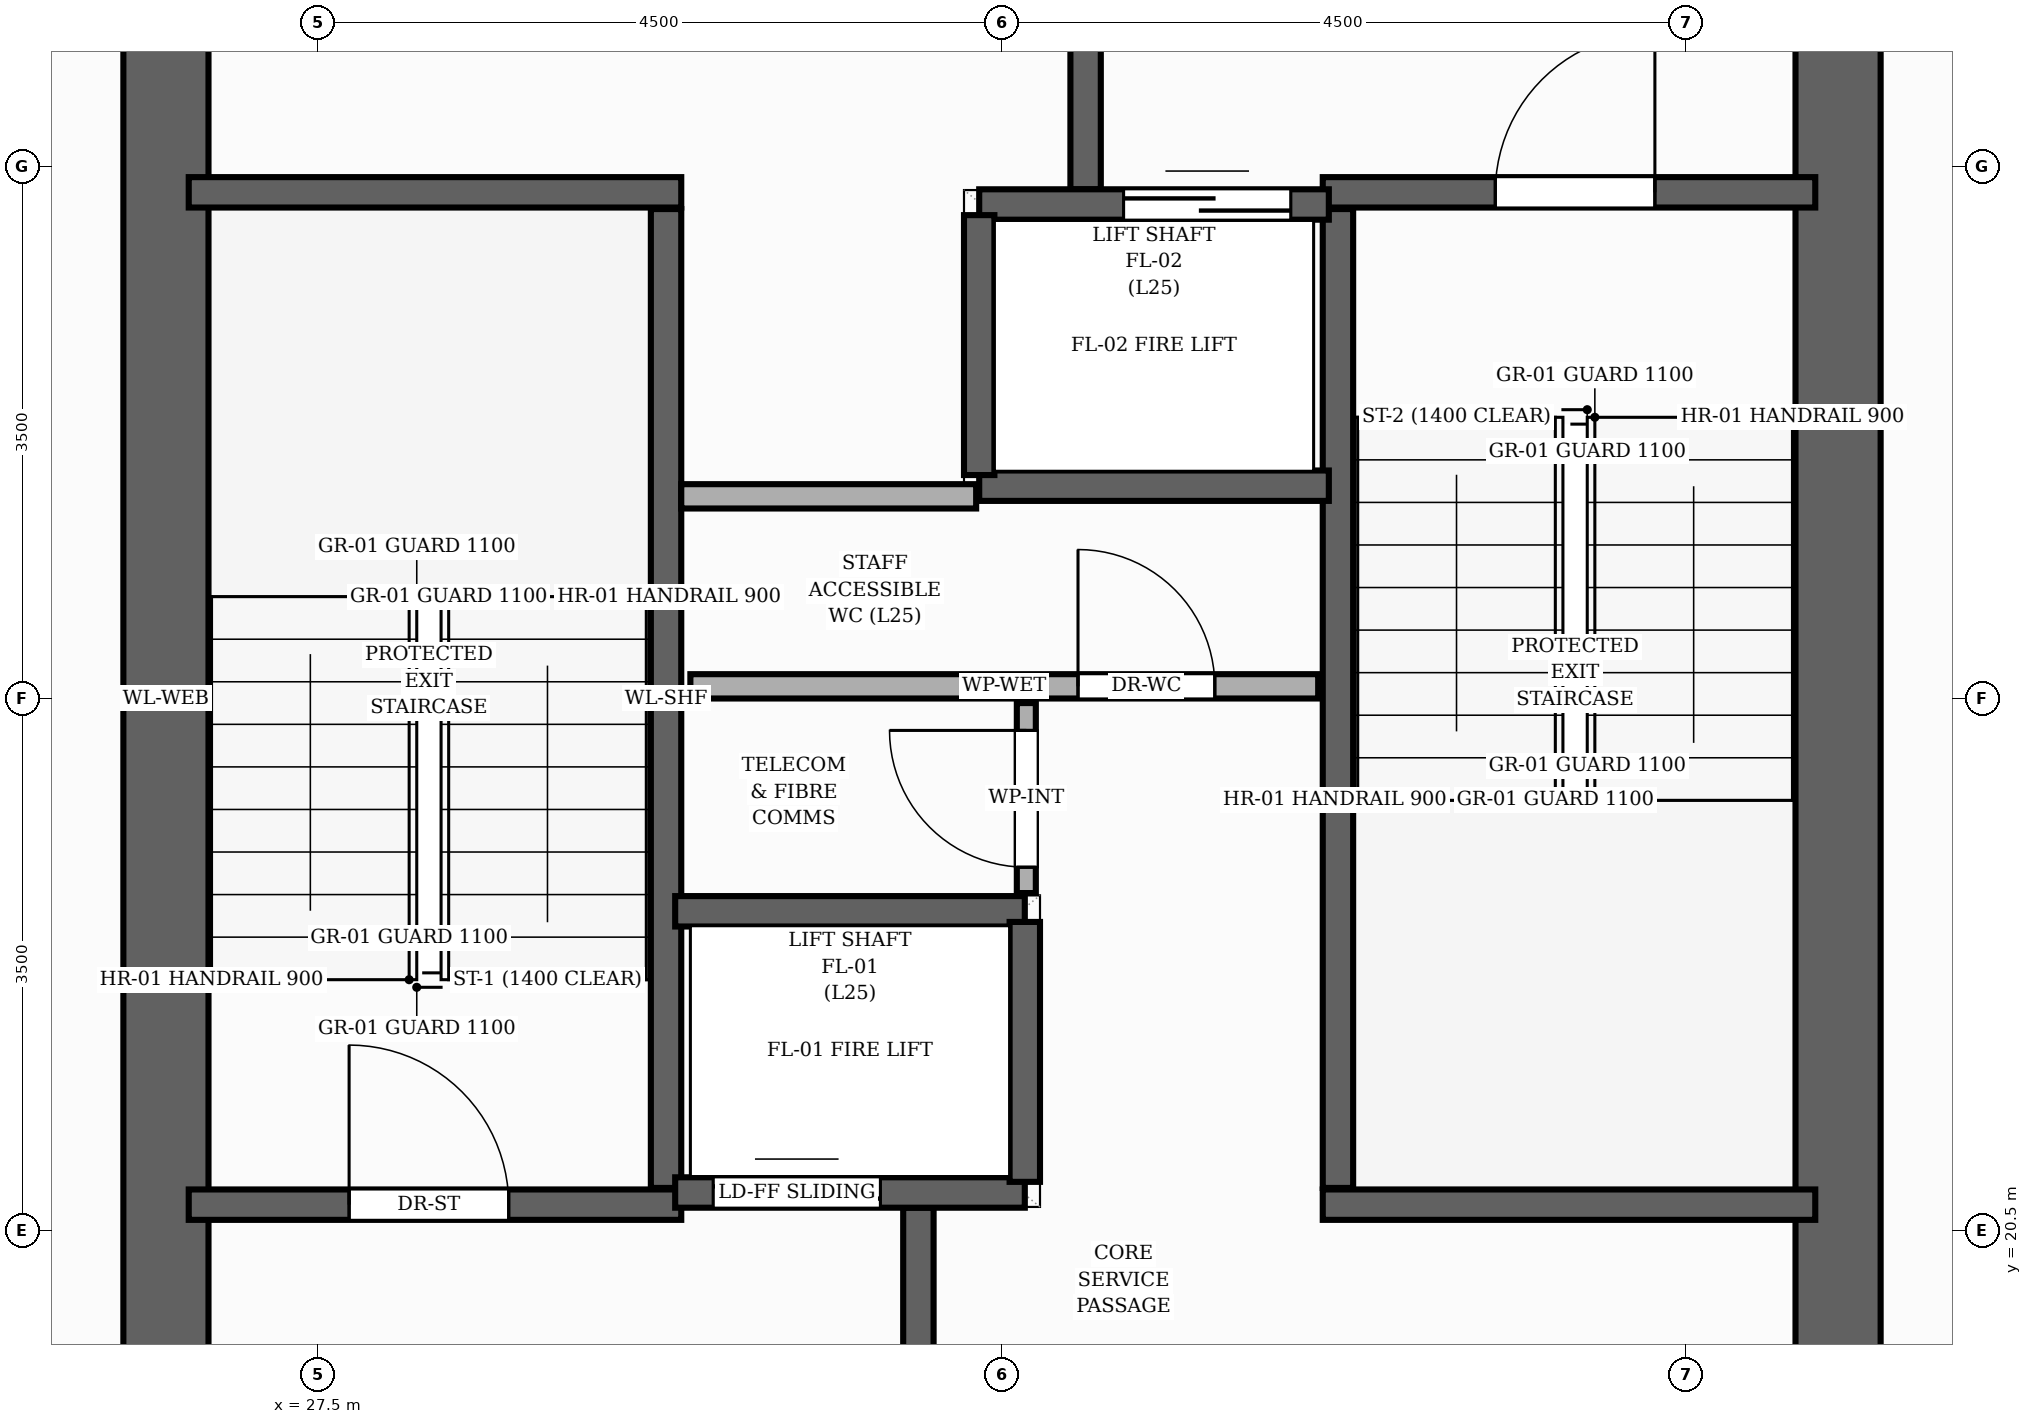
"""IFC4 building model, lengths in metres.
Left out: names, types, materials, properties, quantities, classifications, styles, units other than length and angle.
Written with IfcOpenShell. Run it as: python <this file> out.ifc"""

import sys

from ifc_helpers import new_model, si_unit, direction, frame, frame_2d, origin, place, context, subcontext, project, spatial, rectangle, extrude, element, fill, save


model = new_model("IFC4")
c1 = context("Model", 3, precision=1e-05, world=origin(), true_north=direction((0.0, 1.0)))
c2 = subcontext(c1, "Body", "Model", "MODEL_VIEW")
j1 = project(units=[si_unit("LENGTHUNIT", "METRE"), si_unit("PLANEANGLEUNIT", "RADIAN")], contexts=[c1])
p1 = place(None, origin())
s1 = spatial("IfcSite", under=j1, at=p1, CompositionType="ELEMENT")
p2 = place(p1, origin())
s2 = spatial("IfcBuilding", under=s1, at=p2, CompositionType="ELEMENT")
p3 = place(p2, frame((0.0, 0.0, 83.68)))
s3 = spatial("IfcBuildingStorey", under=s2, at=p3, CompositionType="ELEMENT", Elevation=83.68)
for number, where, z_axis, x_axis in (
    (1, (26.5, 17.35, 0.0), (0.0, 0.0, 1.0), (0.0, 1.0, 0.0)),
    (2, (37.5, 17.35, 0.0), (0.0, 0.0, 1.0), (0.0, 1.0, 0.0)),
):
    element("IfcWall", number, at=place(p3, frame(where, z_axis=z_axis, x_axis=x_axis)), inside=s3, PredefinedType="SHEAR", context=c2, shape_type="SweptSolid", body=[
        extrude(rectangle(XDim=13.3, YDim=0.56, at=frame_2d((6.65, 0.0))), origin(), (0.0, 0.0, 1.0), 3.2),
    ])
p4 = place(p3, frame((29.79, 20.78, 0.0), z_axis=(0.0, 0.0, 1.0), x_axis=(0.0, 1.0, 0.0)))
e3 = element("IfcWall", 3, at=p4, inside=s3, PredefinedType="SHEAR", context=c2, shape_type="SweptSolid", body=[
    extrude(rectangle(XDim=6.44, YDim=0.2, at=frame_2d((3.22, 0.0))), origin(), (0.0, 0.0, 1.0), 3.2),
])
p5 = place(p3, frame((26.65, 27.33, 0.0), z_axis=(0.0, 0.0, 1.0), x_axis=(1.0, 0.0, 0.0)))
e4 = element("IfcWall", 4, at=p5, inside=s3, PredefinedType="SHEAR", context=c2, shape_type="SweptSolid", body=[
    extrude(rectangle(XDim=3.24, YDim=0.2, at=frame_2d((1.62, 0.0))), origin(), (0.0, 0.0, 1.0), 3.2),
])
p6 = place(p3, frame((26.65, 20.67, 0.0), z_axis=(0.0, 0.0, 1.0), x_axis=(1.0, 0.0, 0.0)))
e5 = element("IfcWall", 5, at=p6, inside=s3, PredefinedType="SHEAR", context=c2, shape_type="SweptSolid", body=[
    extrude(rectangle(XDim=3.24, YDim=0.2, at=frame_2d((1.62, 0.0))), origin(), (0.0, 0.0, 1.0), 3.2),
])
p7 = place(p6, frame((1.055, 0.0, 0.0)))
e6 = element("IfcOpeningElement", 6, at=p7, cuts=e5, PredefinedType="OPENING", context=c2, shape_type="SweptSolid", body=[
    extrude(rectangle(XDim=1.05, YDim=2.15, at=frame_2d((0.525, 1.075))), frame((0.0, 0.11, 0.0), z_axis=(0.0, -1.0, 0.0), x_axis=(1.0, 0.0, 0.0)), (0.0, 0.0, 1.0), 0.22),
])
p8 = place(p3, frame((34.21, 20.78, 0.0), z_axis=(0.0, 0.0, 1.0), x_axis=(0.0, 1.0, 0.0)))
e7 = element("IfcWall", 7, at=p8, inside=s3, PredefinedType="SHEAR", context=c2, shape_type="SweptSolid", body=[
    extrude(rectangle(XDim=6.44, YDim=0.2, at=frame_2d((3.22, 0.0))), origin(), (0.0, 0.0, 1.0), 3.2),
])
p9 = place(p3, frame((34.11, 20.67, 0.0), z_axis=(0.0, 0.0, 1.0), x_axis=(1.0, 0.0, 0.0)))
e8 = element("IfcWall", 8, at=p9, inside=s3, PredefinedType="SHEAR", context=c2, shape_type="SweptSolid", body=[
    extrude(rectangle(XDim=3.24, YDim=0.2, at=frame_2d((1.62, 0.0))), origin(), (0.0, 0.0, 1.0), 3.2),
])
p10 = place(p3, frame((34.11, 27.33, 0.0), z_axis=(0.0, 0.0, 1.0), x_axis=(1.0, 0.0, 0.0)))
e9 = element("IfcWall", 9, at=p10, inside=s3, PredefinedType="SHEAR", context=c2, shape_type="SweptSolid", body=[
    extrude(rectangle(XDim=3.24, YDim=0.2, at=frame_2d((1.62, 0.0))), origin(), (0.0, 0.0, 1.0), 3.2),
])
p11 = place(p10, frame((1.135, 0.0, 0.0)))
e10 = element("IfcOpeningElement", 10, at=p11, cuts=e9, PredefinedType="OPENING", context=c2, shape_type="SweptSolid", body=[
    extrude(rectangle(XDim=1.05, YDim=2.15, at=frame_2d((0.525, 1.075))), frame((0.0, 0.11, 0.0), z_axis=(0.0, -1.0, 0.0), x_axis=(1.0, 0.0, 0.0)), (0.0, 0.0, 1.0), 0.22),
])
for number, where, z_axis, x_axis in (
    (11, (31.45, 17.15, 0.0), (0.0, 0.0, 1.0), (0.0, 1.0, 0.0)),
    (12, (32.55, 27.35, 0.0), (0.0, 0.0, 1.0), (0.0, 1.0, 0.0)),
):
    element("IfcWall", number, at=place(p3, frame(where, z_axis=z_axis, x_axis=x_axis)), inside=s3, PredefinedType="SHEAR", context=c2, shape_type="SweptSolid", body=[
        extrude(rectangle(XDim=3.5, YDim=0.2, at=frame_2d((1.75, 0.0))), origin(), (0.0, 0.0, 1.0), 3.2),
    ])
p12 = place(p3, frame((29.85, 20.75, 0.0), z_axis=(0.0, 0.0, 1.0), x_axis=(1.0, 0.0, 0.0)))
e13 = element("IfcWall", 13, at=p12, inside=s3, PredefinedType="SHEAR", context=c2, shape_type="SweptSolid", body=[
    extrude(rectangle(XDim=2.3, YDim=0.2, at=frame_2d((1.15, 0.0))), origin(), (0.0, 0.0, 1.0), 3.2),
])
p13 = place(p12, frame((0.25, 0.0, 0.0)))
e14 = element("IfcOpeningElement", 14, at=p13, cuts=e13, PredefinedType="OPENING", context=c2, shape_type="SweptSolid", body=[
    extrude(rectangle(XDim=1.1, YDim=2.15, at=frame_2d((0.55, 1.075))), frame((0.0, 0.11, 0.0), z_axis=(0.0, -1.0, 0.0), x_axis=(1.0, 0.0, 0.0)), (0.0, 0.0, 1.0), 0.22),
])
p14 = place(p3, frame((29.85, 22.6, 0.0), z_axis=(0.0, 0.0, 1.0), x_axis=(1.0, 0.0, 0.0)))
e15 = element("IfcWall", 15, at=p14, inside=s3, PredefinedType="SHEAR", context=c2, shape_type="SweptSolid", body=[
    extrude(rectangle(XDim=2.3, YDim=0.2, at=frame_2d((1.15, 0.0))), origin(), (0.0, 0.0, 1.0), 3.2),
])
p15 = place(p3, frame((32.15, 20.82, 0.0), z_axis=(0.0, 0.0, 1.0), x_axis=(0.0, 1.0, 0.0)))
e16 = element("IfcWall", 16, at=p15, inside=s3, PredefinedType="SHEAR", context=c2, shape_type="SweptSolid", body=[
    extrude(rectangle(XDim=1.71, YDim=0.2, at=frame_2d((0.855, 0.0))), origin(), (0.0, 0.0, 1.0), 3.2),
])
p16 = place(p3, frame((31.85, 27.25, 0.0), z_axis=(0.0, 0.0, 1.0), x_axis=(1.0, 0.0, 0.0)))
e17 = element("IfcWall", 17, at=p16, inside=s3, PredefinedType="SHEAR", context=c2, shape_type="SweptSolid", body=[
    extrude(rectangle(XDim=2.3, YDim=0.2, at=frame_2d((1.15, 0.0))), origin(), (0.0, 0.0, 1.0), 3.2),
])
p17 = place(p16, frame((0.95, 0.0, 0.0)))
e18 = element("IfcOpeningElement", 18, at=p17, cuts=e17, PredefinedType="OPENING", context=c2, shape_type="SweptSolid", body=[
    extrude(rectangle(XDim=1.1, YDim=2.15, at=frame_2d((0.55, 1.075))), frame((0.0, 0.11, 0.0), z_axis=(0.0, -1.0, 0.0), x_axis=(1.0, 0.0, 0.0)), (0.0, 0.0, 1.0), 0.22),
])
p18 = place(p3, frame((31.85, 25.4, 0.0), z_axis=(0.0, 0.0, 1.0), x_axis=(1.0, 0.0, 0.0)))
e19 = element("IfcWall", 19, at=p18, inside=s3, PredefinedType="SHEAR", context=c2, shape_type="SweptSolid", body=[
    extrude(rectangle(XDim=2.3, YDim=0.2, at=frame_2d((1.15, 0.0))), origin(), (0.0, 0.0, 1.0), 3.2),
])
p19 = place(p3, frame((31.85, 25.47, 0.0), z_axis=(0.0, 0.0, 1.0), x_axis=(0.0, 1.0, 0.0)))
e20 = element("IfcWall", 20, at=p19, inside=s3, PredefinedType="SHEAR", context=c2, shape_type="SweptSolid", body=[
    extrude(rectangle(XDim=1.71, YDim=0.2, at=frame_2d((0.855, 0.0))), origin(), (0.0, 0.0, 1.0), 3.2),
])
p20 = place(p3, frame((29.95, 24.08, 0.0), z_axis=(0.0, 0.0, 1.0), x_axis=(1.0, 0.0, 0.0)))
e21 = element("IfcWall", 21, at=p20, inside=s3, PredefinedType="PLUMBINGWALL", context=c2, shape_type="SweptSolid", body=[
    extrude(rectangle(XDim=4.13, YDim=0.16, at=frame_2d((2.065, 0.0))), origin(), (0.0, 0.0, 1.0), 2.955),
])
p21 = place(p20, frame((2.55, 0.0, 0.0)))
e22 = element("IfcOpeningElement", 22, at=p21, cuts=e21, PredefinedType="OPENING", context=c2, shape_type="SweptSolid", body=[
    extrude(rectangle(XDim=0.9, YDim=2.1, at=frame_2d((0.45, 1.05))), frame((0.0, 0.09, 0.0), z_axis=(0.0, -1.0, 0.0), x_axis=(1.0, 0.0, 0.0)), (0.0, 0.0, 1.0), 0.18),
])
p22 = place(p3, frame((32.16, 22.72, 0.0), z_axis=(0.0, 0.0, 1.0), x_axis=(0.0, 1.0, 0.0)))
e23 = element("IfcWall", 23, at=p22, inside=s3, PredefinedType="PARTITIONING", context=c2, shape_type="SweptSolid", body=[
    extrude(rectangle(XDim=1.25, YDim=0.125, at=frame_2d((0.625, 0.0))), origin(), (0.0, 0.0, 1.0), 2.955),
])
p23 = place(p22, frame((0.17, 0.0, 0.0)))
e24 = element("IfcOpeningElement", 24, at=p23, cuts=e23, PredefinedType="OPENING", context=c2, shape_type="SweptSolid", body=[
    extrude(rectangle(XDim=0.9, YDim=2.1, at=frame_2d((0.45, 1.05))), frame((0.0, 0.073, 0.0), z_axis=(0.0, -1.0, 0.0), x_axis=(1.0, 0.0, 0.0)), (0.0, 0.0, 1.0), 0.145),
])
p24 = place(p3, frame((29.89, 25.33, 0.0), z_axis=(0.0, 0.0, 1.0), x_axis=(1.0, 0.0, 0.0)))
e25 = element("IfcWall", 25, at=p24, inside=s3, PredefinedType="PLUMBINGWALL", context=c2, shape_type="SweptSolid", body=[
    extrude(rectangle(XDim=1.94, YDim=0.16, at=frame_2d((0.97, 0.0))), origin(), (0.0, 0.0, 1.0), 2.955),
])
p25 = place(p7, origin())
e26 = element("IfcDoor", 26, at=p25, inside=s3, OperationType="SINGLE_SWING_LEFT", PredefinedType="DOOR", context=c2, shape_type="SweptSolid", body=[
    extrude(rectangle(XDim=1.05, YDim=2.15, at=frame_2d((0.525, 1.075))), frame((0.0, 0.025, 0.0), z_axis=(0.0, -1.0, 0.0), x_axis=(1.0, 0.0, 0.0)), (0.0, 0.0, 1.0), 0.05),
])
fill(e6, e26)
p26 = place(p11, origin())
e27 = element("IfcDoor", 27, at=p26, inside=s3, OperationType="SINGLE_SWING_RIGHT", PredefinedType="DOOR", context=c2, shape_type="SweptSolid", body=[
    extrude(rectangle(XDim=1.05, YDim=2.15, at=frame_2d((0.525, 1.075))), frame((0.0, 0.025, 0.0), z_axis=(0.0, -1.0, 0.0), x_axis=(1.0, 0.0, 0.0)), (0.0, 0.0, 1.0), 0.05),
])
fill(e10, e27)
p27 = place(p13, origin())
e28 = element("IfcDoor", 28, at=p27, inside=s3, OperationType="DOUBLE_DOOR_SLIDING", PredefinedType="DOOR", context=c2, shape_type="SweptSolid", body=[
    extrude(rectangle(XDim=1.1, YDim=2.15, at=frame_2d((0.55, 1.075))), frame((0.0, 0.025, 0.0), z_axis=(0.0, -1.0, 0.0), x_axis=(1.0, 0.0, 0.0)), (0.0, 0.0, 1.0), 0.05),
])
fill(e14, e28)
p28 = place(p17, origin())
e29 = element("IfcDoor", 29, at=p28, inside=s3, OperationType="DOUBLE_DOOR_SLIDING", PredefinedType="DOOR", context=c2, shape_type="SweptSolid", body=[
    extrude(rectangle(XDim=1.1, YDim=2.15, at=frame_2d((0.55, 1.075))), frame((0.0, 0.025, 0.0), z_axis=(0.0, -1.0, 0.0), x_axis=(1.0, 0.0, 0.0)), (0.0, 0.0, 1.0), 0.05),
])
fill(e18, e29)
p29 = place(p21, origin())
e30 = element("IfcDoor", 30, at=p29, inside=s3, OperationType="SINGLE_SWING_LEFT", PredefinedType="DOOR", context=c2, shape_type="SweptSolid", body=[
    extrude(rectangle(XDim=0.9, YDim=2.1, at=frame_2d((0.45, 1.05))), frame((0.0, 0.025, 0.0), z_axis=(0.0, -1.0, 0.0), x_axis=(1.0, 0.0, 0.0)), (0.0, 0.0, 1.0), 0.05),
])
fill(e22, e30)
p30 = place(p23, origin())
e31 = element("IfcDoor", 31, at=p30, inside=s3, OperationType="SINGLE_SWING_RIGHT", PredefinedType="DOOR", context=c2, shape_type="SweptSolid", body=[
    extrude(rectangle(XDim=0.9, YDim=2.1, at=frame_2d((0.45, 1.05))), frame((0.0, 0.025, 0.0), z_axis=(0.0, -1.0, 0.0), x_axis=(1.0, 0.0, 0.0)), (0.0, 0.0, 1.0), 0.05),
])
fill(e24, e31)
save(model, sys.argv[1])
